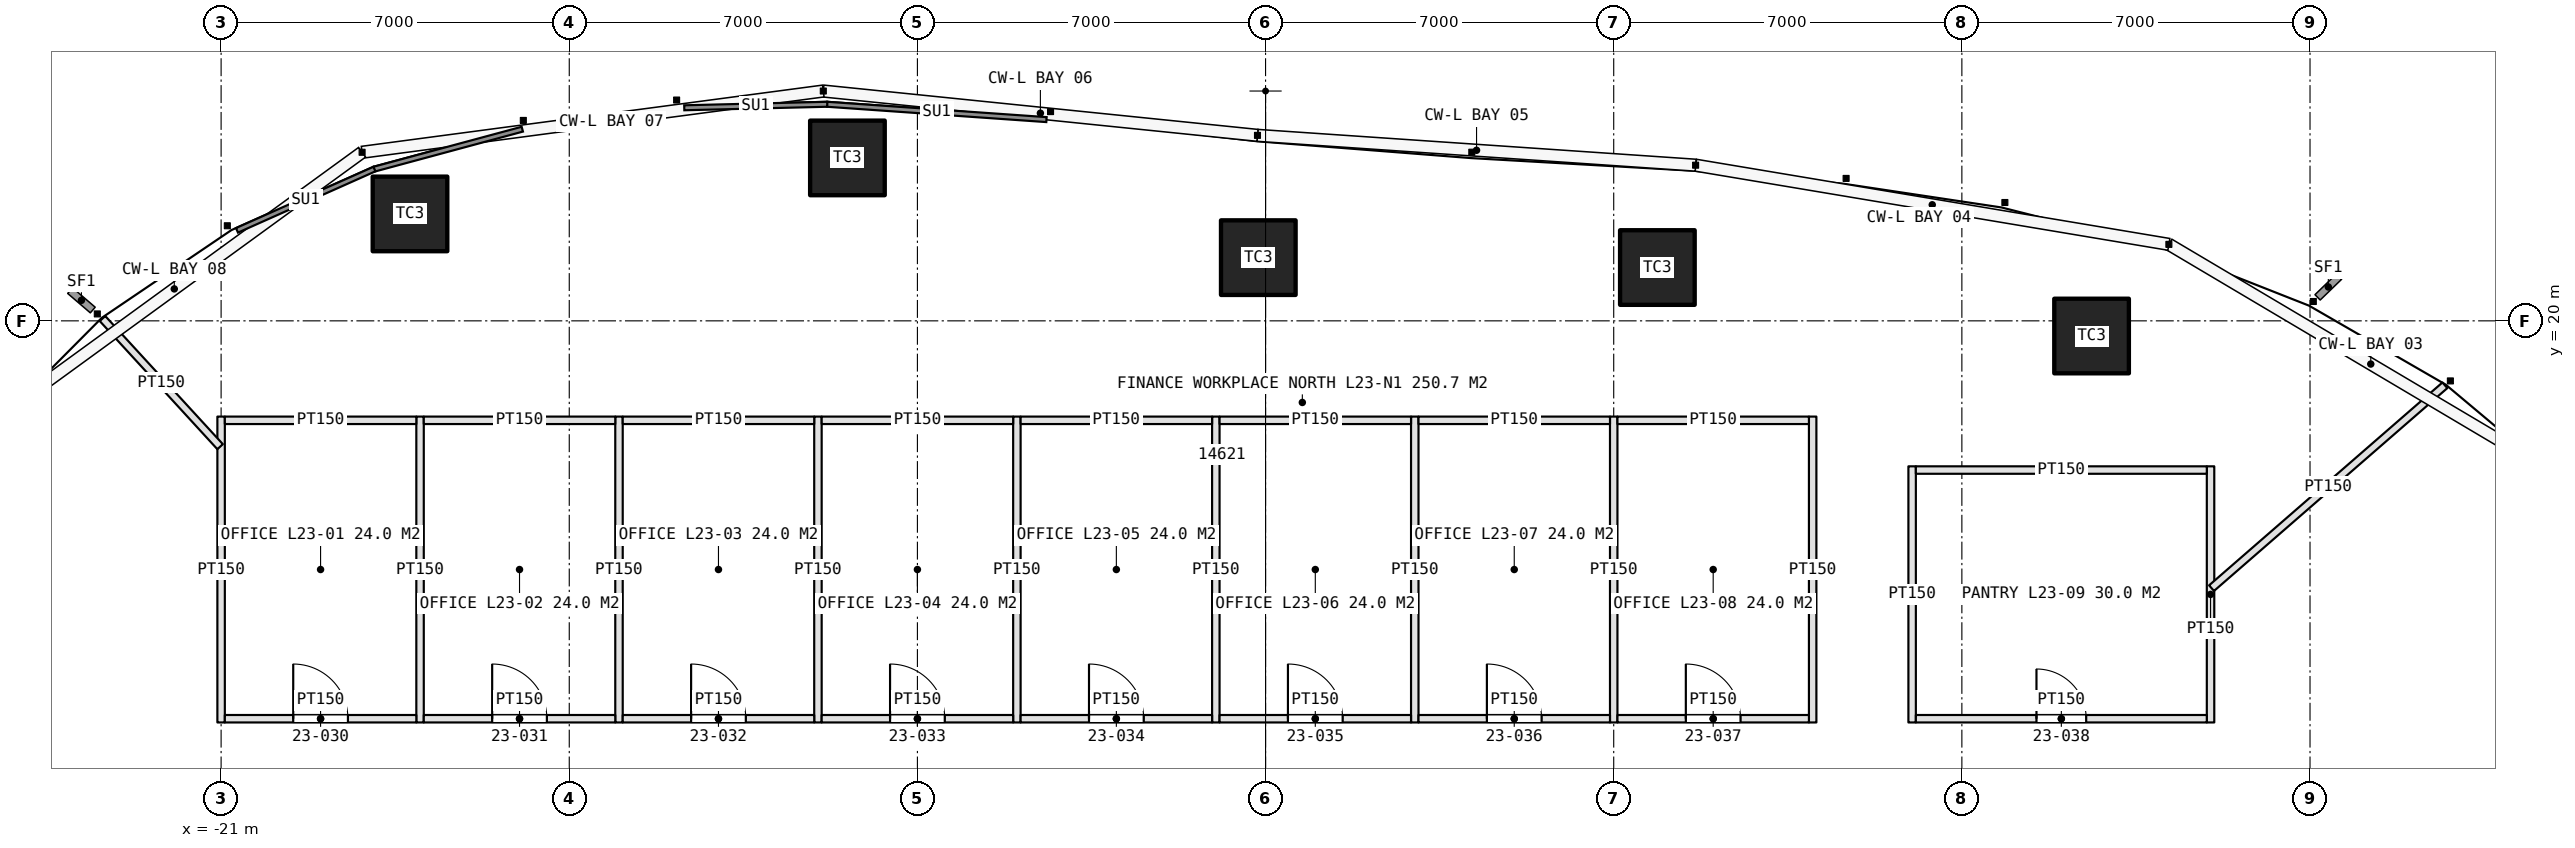
"""IFC4 building model, lengths in metres.
Left out: names, types, materials, properties, quantities, classifications, styles, units other than length and angle.
Written with IfcOpenShell. Run it as: python <this file> out.ifc"""

import sys

from ifc_helpers import new_model, si_unit, direction, frame, frame_2d, origin, origin_2d, place, context, subcontext, project, spatial, rectangle, extrude, element, fill, save


model = new_model("IFC4")
c1 = context("Model", 3, precision=1e-05, world=origin(), true_north=direction((0.0, 1.0)))
c2 = subcontext(c1, "Body", "Model", "MODEL_VIEW")
j1 = project(units=[si_unit("LENGTHUNIT", "METRE"), si_unit("PLANEANGLEUNIT", "RADIAN")], contexts=[c1])
p1 = place(None, origin())
s1 = spatial("IfcSite", under=j1, at=p1, CompositionType="ELEMENT")
p2 = place(p1, origin())
s2 = spatial("IfcBuilding", under=s1, at=p2, CompositionType="ELEMENT")
p3 = place(p2, frame((0.0, 0.0, 113.4)))
s3 = spatial("IfcBuildingStorey", under=s2, at=p3, CompositionType="ELEMENT", Elevation=113.4)
for number, where, z_axis, x_axis in (
    (1, (16.608, 19.695, 0.0), (0.0, 0.0, 1.0), (1.0, 0.0, 0.0)),
    (2, (7.878, 21.072, 0.0), (0.0, 0.0, 1.0), (1.0, 0.0, 0.0)),
    (3, (-0.146, 21.271, 0.0), (0.0, 0.0, 1.0), (1.0, 0.0, 0.0)),
    (4, (-8.407, 23.276, 0.0), (0.0, 0.0, 1.0), (1.0, 0.0, 0.0)),
    (5, (-17.202, 22.15, 0.0), (0.0, 0.0, 1.0), (1.0, 0.0, 0.0)),
):
    element("IfcColumn", number, at=place(p3, frame(where, z_axis=z_axis, x_axis=x_axis)), inside=s3, PredefinedType="COLUMN", context=c2, shape_type="SweptSolid", body=[
        extrude(rectangle(XDim=1.5, YDim=1.5, at=origin_2d()), origin(), (0.0, 0.0, 1.0), 4.2),
    ])
for number, where, z_axis, x_axis in (
    (6, (-21.0, 11.925, 0.0), (0.0, 0.0, 1.0), (0.0, 1.0, 0.0)),
    (7, (-17.0, 11.925, 0.0), (0.0, 0.0, 1.0), (0.0, 1.0, 0.0)),
    (8, (-13.0, 11.925, 0.0), (0.0, 0.0, 1.0), (0.0, 1.0, 0.0)),
    (9, (-9.0, 11.925, 0.0), (0.0, 0.0, 1.0), (0.0, 1.0, 0.0)),
    (10, (-5.0, 11.925, 0.0), (0.0, 0.0, 1.0), (0.0, 1.0, 0.0)),
    (11, (-1.0, 11.925, 0.0), (0.0, 0.0, 1.0), (0.0, 1.0, 0.0)),
    (12, (3.0, 11.925, 0.0), (0.0, 0.0, 1.0), (0.0, 1.0, 0.0)),
    (13, (7.0, 11.925, 0.0), (0.0, 0.0, 1.0), (0.0, 1.0, 0.0)),
    (14, (11.0, 11.925, 0.0), (0.0, 0.0, 1.0), (0.0, 1.0, 0.0)),
):
    element("IfcWall", number, at=place(p3, frame(where, z_axis=z_axis, x_axis=x_axis)), inside=s3, PredefinedType="PARTITIONING", context=c2, shape_type="SweptSolid", body=[
        extrude(rectangle(XDim=6.15, YDim=0.15, at=frame_2d((3.075, 0.0))), origin(), (0.0, 0.0, 1.0), 3.0),
    ])
p4 = place(p3, frame((-20.925, 12.0, 0.0), z_axis=(0.0, 0.0, 1.0), x_axis=(1.0, 0.0, 0.0)))
e15 = element("IfcWall", 15, at=p4, inside=s3, PredefinedType="PARTITIONING", context=c2, shape_type="SweptSolid", body=[
    extrude(rectangle(XDim=3.85, YDim=0.15, at=frame_2d((1.925, 0.0))), origin(), (0.0, 0.0, 1.0), 3.0),
])
p5 = place(p4, frame((1.375, 0.0, 0.0)))
e16 = element("IfcOpeningElement", 16, at=p5, cuts=e15, PredefinedType="OPENING", context=c2, shape_type="SweptSolid", body=[
    extrude(rectangle(XDim=1.1, YDim=2.3, at=frame_2d((0.55, 1.15))), frame((0.0, 0.085, 0.0), z_axis=(0.0, -1.0, 0.0), x_axis=(1.0, 0.0, 0.0)), (0.0, 0.0, 1.0), 0.17),
])
p6 = place(p3, frame((-20.925, 18.0, 0.0), z_axis=(0.0, 0.0, 1.0), x_axis=(1.0, 0.0, 0.0)))
e17 = element("IfcWall", 17, at=p6, inside=s3, PredefinedType="PARTITIONING", context=c2, shape_type="SweptSolid", body=[
    extrude(rectangle(XDim=3.85, YDim=0.15, at=frame_2d((1.925, 0.0))), origin(), (0.0, 0.0, 1.0), 3.0),
])
p7 = place(p3, frame((-16.925, 12.0, 0.0), z_axis=(0.0, 0.0, 1.0), x_axis=(1.0, 0.0, 0.0)))
e18 = element("IfcWall", 18, at=p7, inside=s3, PredefinedType="PARTITIONING", context=c2, shape_type="SweptSolid", body=[
    extrude(rectangle(XDim=3.85, YDim=0.15, at=frame_2d((1.925, 0.0))), origin(), (0.0, 0.0, 1.0), 3.0),
])
p8 = place(p7, frame((1.375, 0.0, 0.0)))
e19 = element("IfcOpeningElement", 19, at=p8, cuts=e18, PredefinedType="OPENING", context=c2, shape_type="SweptSolid", body=[
    extrude(rectangle(XDim=1.1, YDim=2.3, at=frame_2d((0.55, 1.15))), frame((0.0, 0.085, 0.0), z_axis=(0.0, -1.0, 0.0), x_axis=(1.0, 0.0, 0.0)), (0.0, 0.0, 1.0), 0.17),
])
p9 = place(p3, frame((-16.925, 18.0, 0.0), z_axis=(0.0, 0.0, 1.0), x_axis=(1.0, 0.0, 0.0)))
e20 = element("IfcWall", 20, at=p9, inside=s3, PredefinedType="PARTITIONING", context=c2, shape_type="SweptSolid", body=[
    extrude(rectangle(XDim=3.85, YDim=0.15, at=frame_2d((1.925, 0.0))), origin(), (0.0, 0.0, 1.0), 3.0),
])
p10 = place(p3, frame((-12.925, 12.0, 0.0), z_axis=(0.0, 0.0, 1.0), x_axis=(1.0, 0.0, 0.0)))
e21 = element("IfcWall", 21, at=p10, inside=s3, PredefinedType="PARTITIONING", context=c2, shape_type="SweptSolid", body=[
    extrude(rectangle(XDim=3.85, YDim=0.15, at=frame_2d((1.925, 0.0))), origin(), (0.0, 0.0, 1.0), 3.0),
])
p11 = place(p10, frame((1.375, 0.0, 0.0)))
e22 = element("IfcOpeningElement", 22, at=p11, cuts=e21, PredefinedType="OPENING", context=c2, shape_type="SweptSolid", body=[
    extrude(rectangle(XDim=1.1, YDim=2.3, at=frame_2d((0.55, 1.15))), frame((0.0, 0.085, 0.0), z_axis=(0.0, -1.0, 0.0), x_axis=(1.0, 0.0, 0.0)), (0.0, 0.0, 1.0), 0.17),
])
p12 = place(p3, frame((-12.925, 18.0, 0.0), z_axis=(0.0, 0.0, 1.0), x_axis=(1.0, 0.0, 0.0)))
e23 = element("IfcWall", 23, at=p12, inside=s3, PredefinedType="PARTITIONING", context=c2, shape_type="SweptSolid", body=[
    extrude(rectangle(XDim=3.85, YDim=0.15, at=frame_2d((1.925, 0.0))), origin(), (0.0, 0.0, 1.0), 3.0),
])
p13 = place(p3, frame((-8.925, 12.0, 0.0), z_axis=(0.0, 0.0, 1.0), x_axis=(1.0, 0.0, 0.0)))
e24 = element("IfcWall", 24, at=p13, inside=s3, PredefinedType="PARTITIONING", context=c2, shape_type="SweptSolid", body=[
    extrude(rectangle(XDim=3.85, YDim=0.15, at=frame_2d((1.925, 0.0))), origin(), (0.0, 0.0, 1.0), 3.0),
])
p14 = place(p13, frame((1.375, 0.0, 0.0)))
e25 = element("IfcOpeningElement", 25, at=p14, cuts=e24, PredefinedType="OPENING", context=c2, shape_type="SweptSolid", body=[
    extrude(rectangle(XDim=1.1, YDim=2.3, at=frame_2d((0.55, 1.15))), frame((0.0, 0.085, 0.0), z_axis=(0.0, -1.0, 0.0), x_axis=(1.0, 0.0, 0.0)), (0.0, 0.0, 1.0), 0.17),
])
p15 = place(p3, frame((-8.925, 18.0, 0.0), z_axis=(0.0, 0.0, 1.0), x_axis=(1.0, 0.0, 0.0)))
e26 = element("IfcWall", 26, at=p15, inside=s3, PredefinedType="PARTITIONING", context=c2, shape_type="SweptSolid", body=[
    extrude(rectangle(XDim=3.85, YDim=0.15, at=frame_2d((1.925, 0.0))), origin(), (0.0, 0.0, 1.0), 3.0),
])
p16 = place(p3, frame((-4.925, 12.0, 0.0), z_axis=(0.0, 0.0, 1.0), x_axis=(1.0, 0.0, 0.0)))
e27 = element("IfcWall", 27, at=p16, inside=s3, PredefinedType="PARTITIONING", context=c2, shape_type="SweptSolid", body=[
    extrude(rectangle(XDim=3.85, YDim=0.15, at=frame_2d((1.925, 0.0))), origin(), (0.0, 0.0, 1.0), 3.0),
])
p17 = place(p16, frame((1.375, 0.0, 0.0)))
e28 = element("IfcOpeningElement", 28, at=p17, cuts=e27, PredefinedType="OPENING", context=c2, shape_type="SweptSolid", body=[
    extrude(rectangle(XDim=1.1, YDim=2.3, at=frame_2d((0.55, 1.15))), frame((0.0, 0.085, 0.0), z_axis=(0.0, -1.0, 0.0), x_axis=(1.0, 0.0, 0.0)), (0.0, 0.0, 1.0), 0.17),
])
p18 = place(p3, frame((-4.925, 18.0, 0.0), z_axis=(0.0, 0.0, 1.0), x_axis=(1.0, 0.0, 0.0)))
e29 = element("IfcWall", 29, at=p18, inside=s3, PredefinedType="PARTITIONING", context=c2, shape_type="SweptSolid", body=[
    extrude(rectangle(XDim=3.85, YDim=0.15, at=frame_2d((1.925, 0.0))), origin(), (0.0, 0.0, 1.0), 3.0),
])
p19 = place(p3, frame((-0.925, 12.0, 0.0), z_axis=(0.0, 0.0, 1.0), x_axis=(1.0, 0.0, 0.0)))
e30 = element("IfcWall", 30, at=p19, inside=s3, PredefinedType="PARTITIONING", context=c2, shape_type="SweptSolid", body=[
    extrude(rectangle(XDim=3.85, YDim=0.15, at=frame_2d((1.925, 0.0))), origin(), (0.0, 0.0, 1.0), 3.0),
])
p20 = place(p19, frame((1.375, 0.0, 0.0)))
e31 = element("IfcOpeningElement", 31, at=p20, cuts=e30, PredefinedType="OPENING", context=c2, shape_type="SweptSolid", body=[
    extrude(rectangle(XDim=1.1, YDim=2.3, at=frame_2d((0.55, 1.15))), frame((0.0, 0.085, 0.0), z_axis=(0.0, -1.0, 0.0), x_axis=(1.0, 0.0, 0.0)), (0.0, 0.0, 1.0), 0.17),
])
p21 = place(p3, frame((-0.925, 18.0, 0.0), z_axis=(0.0, 0.0, 1.0), x_axis=(1.0, 0.0, 0.0)))
e32 = element("IfcWall", 32, at=p21, inside=s3, PredefinedType="PARTITIONING", context=c2, shape_type="SweptSolid", body=[
    extrude(rectangle(XDim=3.85, YDim=0.15, at=frame_2d((1.925, 0.0))), origin(), (0.0, 0.0, 1.0), 3.0),
])
p22 = place(p3, frame((3.075, 12.0, 0.0), z_axis=(0.0, 0.0, 1.0), x_axis=(1.0, 0.0, 0.0)))
e33 = element("IfcWall", 33, at=p22, inside=s3, PredefinedType="PARTITIONING", context=c2, shape_type="SweptSolid", body=[
    extrude(rectangle(XDim=3.85, YDim=0.15, at=frame_2d((1.925, 0.0))), origin(), (0.0, 0.0, 1.0), 3.0),
])
p23 = place(p22, frame((1.375, 0.0, 0.0)))
e34 = element("IfcOpeningElement", 34, at=p23, cuts=e33, PredefinedType="OPENING", context=c2, shape_type="SweptSolid", body=[
    extrude(rectangle(XDim=1.1, YDim=2.3, at=frame_2d((0.55, 1.15))), frame((0.0, 0.085, 0.0), z_axis=(0.0, -1.0, 0.0), x_axis=(1.0, 0.0, 0.0)), (0.0, 0.0, 1.0), 0.17),
])
p24 = place(p3, frame((3.075, 18.0, 0.0), z_axis=(0.0, 0.0, 1.0), x_axis=(1.0, 0.0, 0.0)))
e35 = element("IfcWall", 35, at=p24, inside=s3, PredefinedType="PARTITIONING", context=c2, shape_type="SweptSolid", body=[
    extrude(rectangle(XDim=3.85, YDim=0.15, at=frame_2d((1.925, 0.0))), origin(), (0.0, 0.0, 1.0), 3.0),
])
p25 = place(p3, frame((7.075, 12.0, 0.0), z_axis=(0.0, 0.0, 1.0), x_axis=(1.0, 0.0, 0.0)))
e36 = element("IfcWall", 36, at=p25, inside=s3, PredefinedType="PARTITIONING", context=c2, shape_type="SweptSolid", body=[
    extrude(rectangle(XDim=3.85, YDim=0.15, at=frame_2d((1.925, 0.0))), origin(), (0.0, 0.0, 1.0), 3.0),
])
p26 = place(p25, frame((1.375, 0.0, 0.0)))
e37 = element("IfcOpeningElement", 37, at=p26, cuts=e36, PredefinedType="OPENING", context=c2, shape_type="SweptSolid", body=[
    extrude(rectangle(XDim=1.1, YDim=2.3, at=frame_2d((0.55, 1.15))), frame((0.0, 0.085, 0.0), z_axis=(0.0, -1.0, 0.0), x_axis=(1.0, 0.0, 0.0)), (0.0, 0.0, 1.0), 0.17),
])
p27 = place(p3, frame((7.075, 18.0, 0.0), z_axis=(0.0, 0.0, 1.0), x_axis=(1.0, 0.0, 0.0)))
e38 = element("IfcWall", 38, at=p27, inside=s3, PredefinedType="PARTITIONING", context=c2, shape_type="SweptSolid", body=[
    extrude(rectangle(XDim=3.85, YDim=0.15, at=frame_2d((1.925, 0.0))), origin(), (0.0, 0.0, 1.0), 3.0),
])
for number, where, z_axis, x_axis in (
    (39, (13.0, 11.925, 0.0), (0.0, 0.0, 1.0), (0.0, 1.0, 0.0)),
    (40, (19.0, 11.925, 0.0), (0.0, 0.0, 1.0), (0.0, 1.0, 0.0)),
):
    element("IfcWall", number, at=place(p3, frame(where, z_axis=z_axis, x_axis=x_axis)), inside=s3, PredefinedType="PARTITIONING", context=c2, shape_type="SweptSolid", body=[
        extrude(rectangle(XDim=5.15, YDim=0.15, at=frame_2d((2.575, 0.0))), origin(), (0.0, 0.0, 1.0), 3.0),
    ])
p28 = place(p3, frame((13.075, 12.0, 0.0), z_axis=(0.0, 0.0, 1.0), x_axis=(1.0, 0.0, 0.0)))
e41 = element("IfcWall", 41, at=p28, inside=s3, PredefinedType="PARTITIONING", context=c2, shape_type="SweptSolid", body=[
    extrude(rectangle(XDim=5.85, YDim=0.15, at=frame_2d((2.925, 0.0))), origin(), (0.0, 0.0, 1.0), 3.0),
])
p29 = place(p28, frame((2.425, 0.0, 0.0)))
e42 = element("IfcOpeningElement", 42, at=p29, cuts=e41, PredefinedType="OPENING", context=c2, shape_type="SweptSolid", body=[
    extrude(rectangle(XDim=1.0, YDim=2.2, at=frame_2d((0.5, 1.1))), frame((0.0, 0.085, 0.0), z_axis=(0.0, -1.0, 0.0), x_axis=(1.0, 0.0, 0.0)), (0.0, 0.0, 1.0), 0.17),
])
p30 = place(p3, frame((13.075, 17.0, 0.0), z_axis=(0.0, 0.0, 1.0), x_axis=(1.0, 0.0, 0.0)))
e43 = element("IfcWall", 43, at=p30, inside=s3, PredefinedType="PARTITIONING", context=c2, shape_type="SweptSolid", body=[
    extrude(rectangle(XDim=5.85, YDim=0.15, at=frame_2d((2.925, 0.0))), origin(), (0.0, 0.0, 1.0), 3.0),
])
p31 = place(p3, frame((-21.02, 17.47, 0.0), z_axis=(0.0, 0.0, 1.0), x_axis=(-0.67615762792, 0.736756989927, 0.0)))
e44 = element("IfcWall", 44, at=p31, inside=s3, PredefinedType="PARTITIONING", context=c2, shape_type="SweptSolid", body=[
    extrude(rectangle(XDim=3.497, YDim=0.15, at=frame_2d((1.749, 0.0))), origin(), (0.0, 0.0, 1.0), 3.0),
])
p32 = place(p3, frame((19.02, 14.625, 0.0), z_axis=(0.0, 0.0, 1.0), x_axis=(0.754691753605, 0.656079535605, 0.0)))
e45 = element("IfcWall", 45, at=p32, inside=s3, PredefinedType="PARTITIONING", context=c2, shape_type="SweptSolid", body=[
    extrude(rectangle(XDim=6.217, YDim=0.15, at=frame_2d((3.108, 0.0))), origin(), (0.0, 0.0, 1.0), 3.0),
])
p33 = place(p5, origin())
e46 = element("IfcDoor", 46, at=p33, inside=s3, OperationType="SINGLE_SWING_LEFT", PredefinedType="DOOR", context=c2, shape_type="SweptSolid", body=[
    extrude(rectangle(XDim=1.1, YDim=2.3, at=frame_2d((0.55, 1.15))), frame((0.0, 0.025, 0.0), z_axis=(0.0, -1.0, 0.0), x_axis=(1.0, 0.0, 0.0)), (0.0, 0.0, 1.0), 0.05),
])
fill(e16, e46)
p34 = place(p8, origin())
e47 = element("IfcDoor", 47, at=p34, inside=s3, OperationType="SINGLE_SWING_LEFT", PredefinedType="DOOR", context=c2, shape_type="SweptSolid", body=[
    extrude(rectangle(XDim=1.1, YDim=2.3, at=frame_2d((0.55, 1.15))), frame((0.0, 0.025, 0.0), z_axis=(0.0, -1.0, 0.0), x_axis=(1.0, 0.0, 0.0)), (0.0, 0.0, 1.0), 0.05),
])
fill(e19, e47)
p35 = place(p11, origin())
e48 = element("IfcDoor", 48, at=p35, inside=s3, OperationType="SINGLE_SWING_LEFT", PredefinedType="DOOR", context=c2, shape_type="SweptSolid", body=[
    extrude(rectangle(XDim=1.1, YDim=2.3, at=frame_2d((0.55, 1.15))), frame((0.0, 0.025, 0.0), z_axis=(0.0, -1.0, 0.0), x_axis=(1.0, 0.0, 0.0)), (0.0, 0.0, 1.0), 0.05),
])
fill(e22, e48)
p36 = place(p14, origin())
e49 = element("IfcDoor", 49, at=p36, inside=s3, OperationType="SINGLE_SWING_LEFT", PredefinedType="DOOR", context=c2, shape_type="SweptSolid", body=[
    extrude(rectangle(XDim=1.1, YDim=2.3, at=frame_2d((0.55, 1.15))), frame((0.0, 0.025, 0.0), z_axis=(0.0, -1.0, 0.0), x_axis=(1.0, 0.0, 0.0)), (0.0, 0.0, 1.0), 0.05),
])
fill(e25, e49)
p37 = place(p17, origin())
e50 = element("IfcDoor", 50, at=p37, inside=s3, OperationType="SINGLE_SWING_LEFT", PredefinedType="DOOR", context=c2, shape_type="SweptSolid", body=[
    extrude(rectangle(XDim=1.1, YDim=2.3, at=frame_2d((0.55, 1.15))), frame((0.0, 0.025, 0.0), z_axis=(0.0, -1.0, 0.0), x_axis=(1.0, 0.0, 0.0)), (0.0, 0.0, 1.0), 0.05),
])
fill(e28, e50)
p38 = place(p20, origin())
e51 = element("IfcDoor", 51, at=p38, inside=s3, OperationType="SINGLE_SWING_LEFT", PredefinedType="DOOR", context=c2, shape_type="SweptSolid", body=[
    extrude(rectangle(XDim=1.1, YDim=2.3, at=frame_2d((0.55, 1.15))), frame((0.0, 0.025, 0.0), z_axis=(0.0, -1.0, 0.0), x_axis=(1.0, 0.0, 0.0)), (0.0, 0.0, 1.0), 0.05),
])
fill(e31, e51)
p39 = place(p23, origin())
e52 = element("IfcDoor", 52, at=p39, inside=s3, OperationType="SINGLE_SWING_LEFT", PredefinedType="DOOR", context=c2, shape_type="SweptSolid", body=[
    extrude(rectangle(XDim=1.1, YDim=2.3, at=frame_2d((0.55, 1.15))), frame((0.0, 0.025, 0.0), z_axis=(0.0, -1.0, 0.0), x_axis=(1.0, 0.0, 0.0)), (0.0, 0.0, 1.0), 0.05),
])
fill(e34, e52)
p40 = place(p26, origin())
e53 = element("IfcDoor", 53, at=p40, inside=s3, OperationType="SINGLE_SWING_LEFT", PredefinedType="DOOR", context=c2, shape_type="SweptSolid", body=[
    extrude(rectangle(XDim=1.1, YDim=2.3, at=frame_2d((0.55, 1.15))), frame((0.0, 0.025, 0.0), z_axis=(0.0, -1.0, 0.0), x_axis=(1.0, 0.0, 0.0)), (0.0, 0.0, 1.0), 0.05),
])
fill(e37, e53)
p41 = place(p29, origin())
e54 = element("IfcDoor", 54, at=p41, inside=s3, OperationType="SINGLE_SWING_LEFT", PredefinedType="DOOR", context=c2, shape_type="SweptSolid", body=[
    extrude(rectangle(XDim=1.0, YDim=2.2, at=frame_2d((0.5, 1.1))), frame((0.0, 0.025, 0.0), z_axis=(0.0, -1.0, 0.0), x_axis=(1.0, 0.0, 0.0)), (0.0, 0.0, 1.0), 0.05),
])
fill(e42, e54)
save(model, sys.argv[1])
